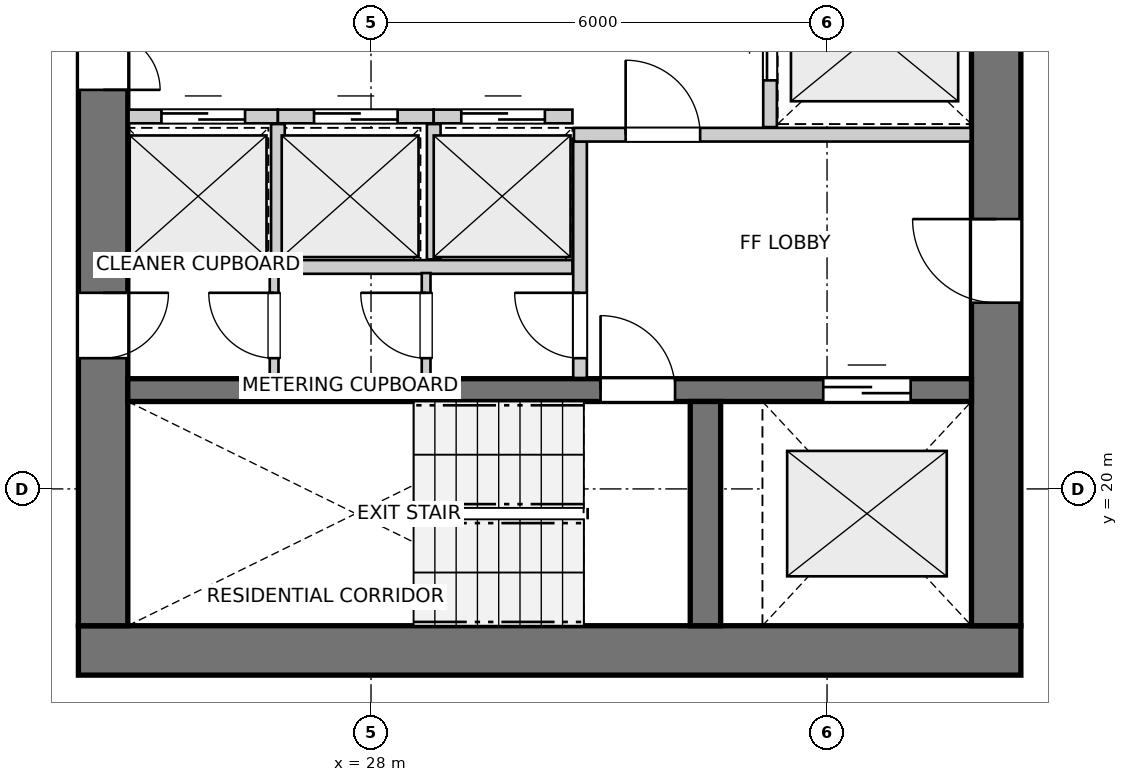
"""IFC4 building model, lengths in metres.
Left out: names, types, materials, properties, quantities, classifications, styles, units other than length and angle.
Written with IfcOpenShell. Run it as: python <this file> out.ifc"""

import sys

from ifc_helpers import new_model, si_unit, direction, frame, frame_2d, origin, place, context, subcontext, project, spatial, rectangle, extrude, source, transform, mapped, element, fill, save


model = new_model("IFC4")
c1 = context("Model", 3, precision=1e-05, world=origin(), true_north=direction((0.0, 1.0)))
c2 = subcontext(c1, "Body", "Model", "MODEL_VIEW")
j1 = project(units=[si_unit("LENGTHUNIT", "METRE"), si_unit("PLANEANGLEUNIT", "RADIAN")], contexts=[c1])
p1 = place(None, origin())
s1 = spatial("IfcSite", under=j1, at=p1, CompositionType="ELEMENT")
p2 = place(p1, origin())
s2 = spatial("IfcBuilding", under=s1, at=p2, CompositionType="ELEMENT")
p3 = place(p2, frame((0.0, 0.0, 89.6)))
s3 = spatial("IfcBuildingStorey", under=s2, at=p3, CompositionType="ELEMENT", Elevation=89.6)
p4 = place(p3, frame((24.15, 17.875, 0.0), z_axis=(0.0, 0.0, 1.0), x_axis=(1.0, 0.0, 0.0)))
e1 = element("IfcWall", 1, at=p4, inside=s3, PredefinedType="SHEAR", context=c2, shape_type="SweptSolid", body=[
    extrude(rectangle(XDim=12.4, YDim=0.65, at=frame_2d((6.2, 0.0))), origin(), (0.0, 0.0, 1.0), 2.95),
])
p5 = place(p3, frame((24.475, 33.8, 0.0), z_axis=(0.0, 0.0, 1.0), x_axis=(0.0, -1.0, 0.0)))
e2 = element("IfcWall", 2, at=p5, inside=s3, PredefinedType="SHEAR", context=c2, shape_type="SweptSolid", body=[
    extrude(rectangle(XDim=15.6, YDim=0.65, at=frame_2d((7.8, 0.0))), origin(), (0.0, 0.0, 1.0), 2.95),
])
p6 = place(p5, frame((7.05, 0.0, 0.0)))
e3 = element("IfcOpeningElement", 3, at=p6, cuts=e2, PredefinedType="OPENING", context=c2, shape_type="SweptSolid", body=[
    extrude(rectangle(XDim=1.5, YDim=2.15, at=frame_2d((0.75, 1.075))), frame((0.0, 0.335, 0.0), z_axis=(0.0, -1.0, 0.0), x_axis=(1.0, 0.0, 0.0)), (0.0, 0.0, 1.0), 0.67),
])
p7 = place(p5, frame((3.52, 0.0, 0.0)))
e4 = element("IfcOpeningElement", 4, at=p7, cuts=e2, PredefinedType="OPENING", context=c2, shape_type="SweptSolid", body=[
    extrude(rectangle(XDim=0.86, YDim=2.05, at=frame_2d((0.43, 1.025))), frame((0.0, 0.335, 0.0), z_axis=(0.0, -1.0, 0.0), x_axis=(1.0, 0.0, 0.0)), (0.0, 0.0, 1.0), 0.67),
])
p8 = place(p5, frame((11.22, 0.0, 0.0)))
e5 = element("IfcOpeningElement", 5, at=p8, cuts=e2, PredefinedType="OPENING", context=c2, shape_type="SweptSolid", body=[
    extrude(rectangle(XDim=0.86, YDim=2.05, at=frame_2d((0.43, 1.025))), frame((0.0, 0.335, 0.0), z_axis=(0.0, -1.0, 0.0), x_axis=(1.0, 0.0, 0.0)), (0.0, 0.0, 1.0), 0.67),
])
p9 = place(p3, frame((36.225, 18.2, 0.0), z_axis=(0.0, 0.0, 1.0), x_axis=(0.0, 1.0, 0.0)))
e6 = element("IfcWall", 6, at=p9, inside=s3, PredefinedType="SHEAR", context=c2, shape_type="SweptSolid", body=[
    extrude(rectangle(XDim=15.6, YDim=0.65, at=frame_2d((7.8, 0.0))), origin(), (0.0, 0.0, 1.0), 2.95),
])
p10 = place(p9, frame((4.25, 0.0, 0.0)))
e7 = element("IfcOpeningElement", 7, at=p10, cuts=e6, PredefinedType="OPENING", context=c2, shape_type="SweptSolid", body=[
    extrude(rectangle(XDim=1.1, YDim=2.15, at=frame_2d((0.55, 1.075))), frame((0.0, 0.335, 0.0), z_axis=(0.0, -1.0, 0.0), x_axis=(1.0, 0.0, 0.0)), (0.0, 0.0, 1.0), 0.67),
])
p11 = place(p9, frame((10.25, 0.0, 0.0)))
e8 = element("IfcOpeningElement", 8, at=p11, cuts=e6, PredefinedType="OPENING", context=c2, shape_type="SweptSolid", body=[
    extrude(rectangle(XDim=1.1, YDim=2.15, at=frame_2d((0.55, 1.075))), frame((0.0, 0.335, 0.0), z_axis=(0.0, -1.0, 0.0), x_axis=(1.0, 0.0, 0.0)), (0.0, 0.0, 1.0), 0.67),
])
p12 = place(p3, frame((24.8, 21.3, 0.0), z_axis=(0.0, 0.0, 1.0), x_axis=(1.0, 0.0, 0.0)))
e9 = element("IfcWall", 9, at=p12, inside=s3, PredefinedType="SHEAR", context=c2, shape_type="SweptSolid", body=[
    extrude(rectangle(XDim=11.1, YDim=0.3, at=frame_2d((5.55, 0.0))), origin(), (0.0, 0.0, 1.0), 2.95),
])
p13 = place(p12, frame((6.22, 0.0, 0.0)))
e10 = element("IfcOpeningElement", 10, at=p13, cuts=e9, PredefinedType="OPENING", context=c2, shape_type="SweptSolid", body=[
    extrude(rectangle(XDim=0.98, YDim=2.15, at=frame_2d((0.49, 1.075))), frame((0.0, 0.16, 0.0), z_axis=(0.0, -1.0, 0.0), x_axis=(1.0, 0.0, 0.0)), (0.0, 0.0, 1.0), 0.32),
])
p14 = place(p12, frame((9.15, 0.0, 0.0)))
e11 = element("IfcOpeningElement", 11, at=p14, cuts=e9, PredefinedType="OPENING", context=c2, shape_type="SweptSolid", body=[
    extrude(rectangle(XDim=1.15, YDim=2.15, at=frame_2d((0.575, 1.075))), frame((0.0, 0.16, 0.0), z_axis=(0.0, -1.0, 0.0), x_axis=(1.0, 0.0, 0.0)), (0.0, 0.0, 1.0), 0.32),
])
p15 = place(p3, frame((32.4, 18.2, 0.0), z_axis=(0.0, 0.0, 1.0), x_axis=(0.0, 1.0, 0.0)))
e12 = element("IfcWall", 12, at=p15, inside=s3, PredefinedType="SHEAR", context=c2, shape_type="SweptSolid", body=[
    extrude(rectangle(XDim=2.95, YDim=0.4, at=frame_2d((1.475, 0.0))), origin(), (0.0, 0.0, 1.0), 2.95),
])
p16 = place(p3, frame((30.75, 21.46, 0.0), z_axis=(0.0, 0.0, 1.0), x_axis=(0.0, 1.0, 0.0)))
e13 = element("IfcWall", 13, at=p16, inside=s3, PredefinedType="PARTITIONING", context=c2, shape_type="SweptSolid", body=[
    extrude(rectangle(XDim=3.11, YDim=0.18, at=frame_2d((1.555, 0.0))), origin(), (0.0, 0.0, 1.0), 2.95),
])
p17 = place(p16, frame((0.26, 0.0, 0.0)))
e14 = element("IfcOpeningElement", 14, at=p17, cuts=e13, PredefinedType="OPENING", context=c2, shape_type="SweptSolid", body=[
    extrude(rectangle(XDim=0.86, YDim=2.05, at=frame_2d((0.43, 1.025))), frame((0.0, 0.1, 0.0), z_axis=(0.0, -1.0, 0.0), x_axis=(1.0, 0.0, 0.0)), (0.0, 0.0, 1.0), 0.2),
])
p18 = place(p3, frame((30.67, 24.66, 0.0), z_axis=(0.0, 0.0, 1.0), x_axis=(1.0, 0.0, 0.0)))
e15 = element("IfcWall", 15, at=p18, inside=s3, PredefinedType="PARTITIONING", context=c2, shape_type="SweptSolid", body=[
    extrude(rectangle(XDim=5.22, YDim=0.18, at=frame_2d((2.61, 0.0))), origin(), (0.0, 0.0, 1.0), 2.95),
])
p19 = place(p18, frame((0.68, 0.0, 0.0)))
e16 = element("IfcOpeningElement", 16, at=p19, cuts=e15, PredefinedType="OPENING", context=c2, shape_type="SweptSolid", body=[
    extrude(rectangle(XDim=0.98, YDim=2.15, at=frame_2d((0.49, 1.075))), frame((0.0, 0.1, 0.0), z_axis=(0.0, -1.0, 0.0), x_axis=(1.0, 0.0, 0.0)), (0.0, 0.0, 1.0), 0.2),
])
p20 = place(p3, frame((33.25, 24.76, 0.0), z_axis=(0.0, 0.0, 1.0), x_axis=(0.0, 1.0, 0.0)))
e17 = element("IfcWall", 17, at=p20, inside=s3, PredefinedType="PARTITIONING", context=c2, shape_type="SweptSolid", body=[
    extrude(rectangle(XDim=2.48, YDim=0.18, at=frame_2d((1.24, 0.0))), origin(), (0.0, 0.0, 1.0), 2.95),
])
p21 = place(p20, frame((0.615, 0.0, 0.0)))
e18 = element("IfcOpeningElement", 18, at=p21, cuts=e17, PredefinedType="OPENING", context=c2, shape_type="SweptSolid", body=[
    extrude(rectangle(XDim=1.25, YDim=2.15, at=frame_2d((0.625, 1.075))), frame((0.0, 0.1, 0.0), z_axis=(0.0, -1.0, 0.0), x_axis=(1.0, 0.0, 0.0)), (0.0, 0.0, 1.0), 0.2),
])
p22 = place(p3, frame((24.81, 22.92, 0.0), z_axis=(0.0, 0.0, 1.0), x_axis=(1.0, 0.0, 0.0)))
e19 = element("IfcWall", 19, at=p22, inside=s3, PredefinedType="PARTITIONING", context=c2, shape_type="SweptSolid", body=[
    extrude(rectangle(XDim=5.84, YDim=0.18, at=frame_2d((2.92, 0.0))), origin(), (0.0, 0.0, 1.0), 2.95),
])
p23 = place(p3, frame((24.81, 24.9, 0.0), z_axis=(0.0, 0.0, 1.0), x_axis=(1.0, 0.0, 0.0)))
e20 = element("IfcWall", 20, at=p23, inside=s3, PredefinedType="PARTITIONING", context=c2, shape_type="SweptSolid", body=[
    extrude(rectangle(XDim=1.965, YDim=0.18, at=frame_2d((0.982, 0.0))), origin(), (0.0, 0.0, 1.0), 2.95),
])
p24 = place(p23, frame((0.433, 0.0, 0.0)))
e21 = element("IfcOpeningElement", 21, at=p24, cuts=e20, PredefinedType="OPENING", context=c2, shape_type="SweptSolid", body=[
    extrude(rectangle(XDim=1.1, YDim=2.15, at=frame_2d((0.55, 1.075))), frame((0.0, 0.1, 0.0), z_axis=(0.0, -1.0, 0.0), x_axis=(1.0, 0.0, 0.0)), (0.0, 0.0, 1.0), 0.2),
])
p25 = place(p3, frame((26.775, 24.9, 0.0), z_axis=(0.0, 0.0, 1.0), x_axis=(1.0, 0.0, 0.0)))
e22 = element("IfcWall", 22, at=p25, inside=s3, PredefinedType="PARTITIONING", context=c2, shape_type="SweptSolid", body=[
    extrude(rectangle(XDim=2.05, YDim=0.18, at=frame_2d((1.025, 0.0))), origin(), (0.0, 0.0, 1.0), 2.95),
])
p26 = place(p25, frame((0.475, 0.0, 0.0)))
e23 = element("IfcOpeningElement", 23, at=p26, cuts=e22, PredefinedType="OPENING", context=c2, shape_type="SweptSolid", body=[
    extrude(rectangle(XDim=1.1, YDim=2.15, at=frame_2d((0.55, 1.075))), frame((0.0, 0.1, 0.0), z_axis=(0.0, -1.0, 0.0), x_axis=(1.0, 0.0, 0.0)), (0.0, 0.0, 1.0), 0.2),
])
p27 = place(p3, frame((26.775, 23.02, 0.0), z_axis=(0.0, 0.0, 1.0), x_axis=(0.0, 1.0, 0.0)))
e24 = element("IfcWall", 24, at=p27, inside=s3, PredefinedType="PARTITIONING", context=c2, shape_type="SweptSolid", body=[
    extrude(rectangle(XDim=1.78, YDim=0.18, at=frame_2d((0.89, 0.0))), origin(), (0.0, 0.0, 1.0), 2.95),
])
p28 = place(p3, frame((28.825, 24.9, 0.0), z_axis=(0.0, 0.0, 1.0), x_axis=(1.0, 0.0, 0.0)))
e25 = element("IfcWall", 25, at=p28, inside=s3, PredefinedType="PARTITIONING", context=c2, shape_type="SweptSolid", body=[
    extrude(rectangle(XDim=1.825, YDim=0.18, at=frame_2d((0.913, 0.0))), origin(), (0.0, 0.0, 1.0), 2.95),
])
p29 = place(p28, frame((0.363, 0.0, 0.0)))
e26 = element("IfcOpeningElement", 26, at=p29, cuts=e25, PredefinedType="OPENING", context=c2, shape_type="SweptSolid", body=[
    extrude(rectangle(XDim=1.1, YDim=2.15, at=frame_2d((0.55, 1.075))), frame((0.0, 0.1, 0.0), z_axis=(0.0, -1.0, 0.0), x_axis=(1.0, 0.0, 0.0)), (0.0, 0.0, 1.0), 0.2),
])
p30 = place(p3, frame((28.825, 23.02, 0.0), z_axis=(0.0, 0.0, 1.0), x_axis=(0.0, 1.0, 0.0)))
e27 = element("IfcWall", 27, at=p30, inside=s3, PredefinedType="PARTITIONING", context=c2, shape_type="SweptSolid", body=[
    extrude(rectangle(XDim=1.78, YDim=0.18, at=frame_2d((0.89, 0.0))), origin(), (0.0, 0.0, 1.0), 2.95),
])
p31 = place(p3, frame((26.725, 21.46, 0.0), z_axis=(0.0, 0.0, 1.0), x_axis=(0.0, 1.0, 0.0)))
e28 = element("IfcWall", 28, at=p31, inside=s3, PredefinedType="PARTITIONING", context=c2, shape_type="SweptSolid", body=[
    extrude(rectangle(XDim=1.38, YDim=0.115, at=frame_2d((0.69, 0.0))), origin(), (0.0, 0.0, 1.0), 2.95),
])
p32 = place(p31, frame((0.26, 0.0, 0.0)))
e29 = element("IfcOpeningElement", 29, at=p32, cuts=e28, PredefinedType="OPENING", context=c2, shape_type="SweptSolid", body=[
    extrude(rectangle(XDim=0.86, YDim=2.05, at=frame_2d((0.43, 1.025))), frame((0.0, 0.067, 0.0), z_axis=(0.0, -1.0, 0.0), x_axis=(1.0, 0.0, 0.0)), (0.0, 0.0, 1.0), 0.135),
])
p33 = place(p3, frame((28.725, 21.46, 0.0), z_axis=(0.0, 0.0, 1.0), x_axis=(0.0, 1.0, 0.0)))
e30 = element("IfcWall", 30, at=p33, inside=s3, PredefinedType="PARTITIONING", context=c2, shape_type="SweptSolid", body=[
    extrude(rectangle(XDim=1.38, YDim=0.115, at=frame_2d((0.69, 0.0))), origin(), (0.0, 0.0, 1.0), 2.95),
])
p34 = place(p33, frame((0.26, 0.0, 0.0)))
e31 = element("IfcOpeningElement", 31, at=p34, cuts=e30, PredefinedType="OPENING", context=c2, shape_type="SweptSolid", body=[
    extrude(rectangle(XDim=0.86, YDim=2.05, at=frame_2d((0.43, 1.025))), frame((0.0, 0.067, 0.0), z_axis=(0.0, -1.0, 0.0), x_axis=(1.0, 0.0, 0.0)), (0.0, 0.0, 1.0), 0.135),
])
m1 = source(origin(), c2, "Body", "SweptSolid", [
    extrude(rectangle(XDim=0.98, YDim=2.15, at=frame_2d((0.49, 1.075))), frame((0.0, 0.025, 0.0), z_axis=(0.0, -1.0, 0.0), x_axis=(1.0, 0.0, 0.0)), (0.0, 0.0, 1.0), 0.05),
])
p35 = place(p13, origin())
e32 = element("IfcDoor", 32, at=p35, inside=s3, OperationType="SINGLE_SWING_LEFT", PredefinedType="DOOR", context=c2, shape_type="MappedRepresentation", body=[
    mapped(m1, transform((0.0, 0.0, 0.0), x_axis=(1.0, 0.0, 0.0), y_axis=(0.0, 1.0, 0.0), z_axis=(0.0, 0.0, 1.0), scale=1.0)),
])
fill(e10, e32)
m2 = source(origin(), c2, "Body", "SweptSolid", [
    extrude(rectangle(XDim=1.15, YDim=2.15, at=frame_2d((0.575, 1.075))), frame((0.0, 0.025, 0.0), z_axis=(0.0, -1.0, 0.0), x_axis=(1.0, 0.0, 0.0)), (0.0, 0.0, 1.0), 0.05),
])
p36 = place(p14, origin())
e33 = element("IfcDoor", 33, at=p36, inside=s3, OperationType="DOUBLE_DOOR_SLIDING", PredefinedType="DOOR", context=c2, shape_type="MappedRepresentation", body=[
    mapped(m2, transform((0.0, 0.0, 0.0), x_axis=(1.0, 0.0, 0.0), y_axis=(0.0, 1.0, 0.0), z_axis=(0.0, 0.0, 1.0), scale=1.0)),
])
fill(e11, e33)
m3 = source(origin(), c2, "Body", "SweptSolid", [
    extrude(rectangle(XDim=1.1, YDim=2.15, at=frame_2d((0.55, 1.075))), frame((0.0, 0.025, 0.0), z_axis=(0.0, -1.0, 0.0), x_axis=(1.0, 0.0, 0.0)), (0.0, 0.0, 1.0), 0.05),
])
p37 = place(p10, origin())
e34 = element("IfcDoor", 34, at=p37, inside=s3, OperationType="SINGLE_SWING_RIGHT", PredefinedType="DOOR", context=c2, shape_type="MappedRepresentation", body=[
    mapped(m3, transform((0.0, 0.0, 0.0), x_axis=(1.0, 0.0, 0.0), y_axis=(0.0, 1.0, 0.0), z_axis=(0.0, 0.0, 1.0), scale=1.0)),
])
fill(e7, e34)
m4 = source(origin(), c2, "Body", "SweptSolid", [
    extrude(rectangle(XDim=1.5, YDim=2.15, at=frame_2d((0.75, 1.075))), frame((0.0, 0.025, 0.0), z_axis=(0.0, -1.0, 0.0), x_axis=(1.0, 0.0, 0.0)), (0.0, 0.0, 1.0), 0.05),
])
p38 = place(p6, origin())
e35 = element("IfcDoor", 35, at=p38, inside=s3, OperationType="DOUBLE_DOOR_SINGLE_SWING", PredefinedType="DOOR", context=c2, shape_type="MappedRepresentation", body=[
    mapped(m4, transform((0.0, 0.0, 0.0), x_axis=(1.0, 0.0, 0.0), y_axis=(0.0, 1.0, 0.0), z_axis=(0.0, 0.0, 1.0), scale=1.0)),
])
fill(e3, e35)
m5 = source(origin(), c2, "Body", "SweptSolid", [
    extrude(rectangle(XDim=0.86, YDim=2.05, at=frame_2d((0.43, 1.025))), frame((0.0, 0.025, 0.0), z_axis=(0.0, -1.0, 0.0), x_axis=(1.0, 0.0, 0.0)), (0.0, 0.0, 1.0), 0.05),
])
p39 = place(p8, origin())
e36 = element("IfcDoor", 36, at=p39, inside=s3, OperationType="SINGLE_SWING_LEFT", PredefinedType="DOOR", context=c2, shape_type="MappedRepresentation", body=[
    mapped(m5, transform((0.0, 0.0, 0.0), x_axis=(1.0, 0.0, 0.0), y_axis=(0.0, 1.0, 0.0), z_axis=(0.0, 0.0, 1.0), scale=1.0)),
])
fill(e5, e36)
p40 = place(p17, origin())
e37 = element("IfcDoor", 37, at=p40, inside=s3, OperationType="SINGLE_SWING_RIGHT", PredefinedType="DOOR", context=c2, shape_type="MappedRepresentation", body=[
    mapped(m5, transform((0.0, 0.0, 0.0), x_axis=(1.0, 0.0, 0.0), y_axis=(0.0, 1.0, 0.0), z_axis=(0.0, 0.0, 1.0), scale=1.0)),
])
fill(e14, e37)
p41 = place(p19, origin())
e38 = element("IfcDoor", 38, at=p41, inside=s3, OperationType="SINGLE_SWING_LEFT", PredefinedType="DOOR", context=c2, shape_type="MappedRepresentation", body=[
    mapped(m1, transform((0.0, 0.0, 0.0), x_axis=(1.0, 0.0, 0.0), y_axis=(0.0, 1.0, 0.0), z_axis=(0.0, 0.0, 1.0), scale=1.0)),
])
fill(e16, e38)
m6 = source(origin(), c2, "Body", "SweptSolid", [
    extrude(rectangle(XDim=1.25, YDim=2.15, at=frame_2d((0.625, 1.075))), frame((0.0, 0.025, 0.0), z_axis=(0.0, -1.0, 0.0), x_axis=(1.0, 0.0, 0.0)), (0.0, 0.0, 1.0), 0.05),
])
p42 = place(p21, origin())
e39 = element("IfcDoor", 39, at=p42, inside=s3, OperationType="DOUBLE_DOOR_SLIDING", PredefinedType="DOOR", context=c2, shape_type="MappedRepresentation", body=[
    mapped(m6, transform((0.0, 0.0, 0.0), x_axis=(1.0, 0.0, 0.0), y_axis=(0.0, 1.0, 0.0), z_axis=(0.0, 0.0, 1.0), scale=1.0)),
])
fill(e18, e39)
p43 = place(p24, origin())
e40 = element("IfcDoor", 40, at=p43, inside=s3, OperationType="DOUBLE_DOOR_SLIDING", PredefinedType="DOOR", context=c2, shape_type="MappedRepresentation", body=[
    mapped(m3, transform((0.0, 0.0, 0.0), x_axis=(1.0, 0.0, 0.0), y_axis=(0.0, 1.0, 0.0), z_axis=(0.0, 0.0, 1.0), scale=1.0)),
])
fill(e21, e40)
p44 = place(p26, origin())
e41 = element("IfcDoor", 41, at=p44, inside=s3, OperationType="DOUBLE_DOOR_SLIDING", PredefinedType="DOOR", context=c2, shape_type="MappedRepresentation", body=[
    mapped(m3, transform((0.0, 0.0, 0.0), x_axis=(1.0, 0.0, 0.0), y_axis=(0.0, 1.0, 0.0), z_axis=(0.0, 0.0, 1.0), scale=1.0)),
])
fill(e23, e41)
p45 = place(p29, origin())
e42 = element("IfcDoor", 42, at=p45, inside=s3, OperationType="DOUBLE_DOOR_SLIDING", PredefinedType="DOOR", context=c2, shape_type="MappedRepresentation", body=[
    mapped(m3, transform((0.0, 0.0, 0.0), x_axis=(1.0, 0.0, 0.0), y_axis=(0.0, 1.0, 0.0), z_axis=(0.0, 0.0, 1.0), scale=1.0)),
])
fill(e26, e42)
p46 = place(p32, origin())
e43 = element("IfcDoor", 43, at=p46, inside=s3, OperationType="SINGLE_SWING_RIGHT", PredefinedType="DOOR", context=c2, shape_type="MappedRepresentation", body=[
    mapped(m5, transform((0.0, 0.0, 0.0), x_axis=(1.0, 0.0, 0.0), y_axis=(0.0, 1.0, 0.0), z_axis=(0.0, 0.0, 1.0), scale=1.0)),
])
fill(e29, e43)
p47 = place(p34, origin())
e44 = element("IfcDoor", 44, at=p47, inside=s3, OperationType="SINGLE_SWING_RIGHT", PredefinedType="DOOR", context=c2, shape_type="MappedRepresentation", body=[
    mapped(m5, transform((0.0, 0.0, 0.0), x_axis=(1.0, 0.0, 0.0), y_axis=(0.0, 1.0, 0.0), z_axis=(0.0, 0.0, 1.0), scale=1.0)),
])
fill(e31, e44)
save(model, sys.argv[1])
